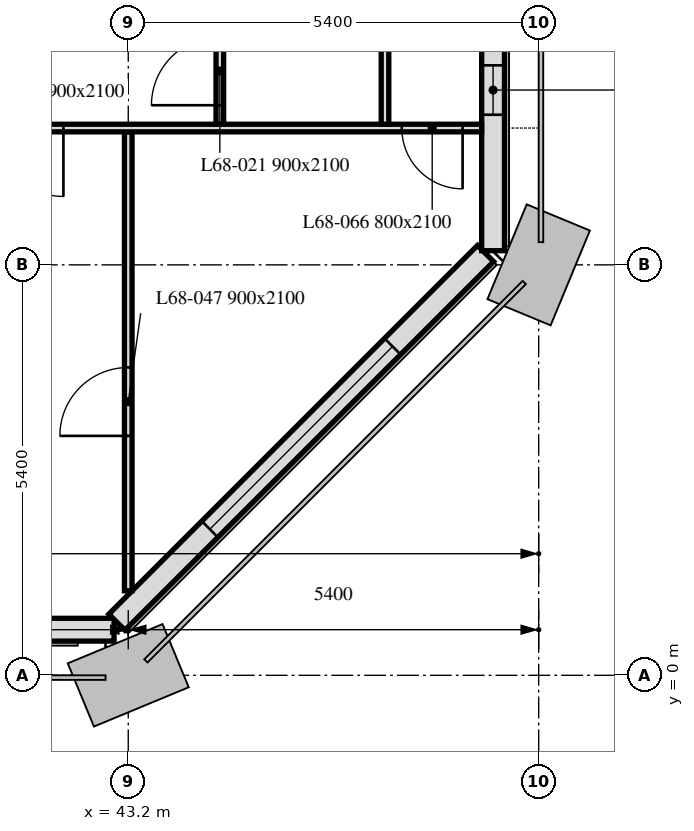
"""IFC4 building model, lengths in metres.
Left out: names, types, materials, properties, quantities, classifications, styles, units other than length and angle.
Written with IfcOpenShell. Run it as: python <this file> out.ifc"""

import sys

from ifc_helpers import new_model, si_unit, direction, frame, frame_2d, origin, place, context, subcontext, project, spatial, rectangle, extrude, element, fill, save


model = new_model("IFC4")
c1 = context("Model", 3, precision=1e-05, world=origin(), true_north=direction((0.0, 1.0)))
c2 = subcontext(c1, "Body", "Model", "MODEL_VIEW")
j1 = project(units=[si_unit("LENGTHUNIT", "METRE"), si_unit("PLANEANGLEUNIT", "RADIAN")], contexts=[c1])
p1 = place(None, origin())
s1 = spatial("IfcSite", under=j1, at=p1, CompositionType="ELEMENT")
p2 = place(p1, origin())
s2 = spatial("IfcBuilding", under=s1, at=p2, CompositionType="ELEMENT")
p3 = place(p2, frame((0.0, 0.0, 278.5)))
s3 = spatial("IfcBuildingStorey", under=s2, at=p3, CompositionType="ELEMENT", Elevation=278.5)
p4 = place(p3, frame((10.986, 0.6, 0.0), z_axis=(0.0, 0.0, 1.0), x_axis=(1.0, 0.0, 0.0)))
e1 = element("IfcWall", 1, at=p4, inside=s3, PredefinedType="SOLIDWALL", context=c2, shape_type="SweptSolid", body=[
    extrude(rectangle(XDim=32.027, YDim=0.3, at=frame_2d((16.014, 0.0))), origin(), (0.0, 0.0, 1.0), 3.0),
])
p5 = place(p4, frame((0.814, 0.0, 0.9)))
e2 = element("IfcOpeningElement", 2, at=p5, cuts=e1, PredefinedType="OPENING", context=c2, shape_type="SweptSolid", body=[
    extrude(rectangle(XDim=3.4, YDim=1.7, at=frame_2d((1.7, 0.85))), frame((0.0, 0.16, 0.0), z_axis=(0.0, -1.0, 0.0), x_axis=(1.0, 0.0, 0.0)), (0.0, 0.0, 1.0), 0.32),
])
p6 = place(p4, frame((6.564, 0.0, 0.9)))
e3 = element("IfcOpeningElement", 3, at=p6, cuts=e1, PredefinedType="OPENING", context=c2, shape_type="SweptSolid", body=[
    extrude(rectangle(XDim=1.1, YDim=1.7, at=frame_2d((0.55, 0.85))), frame((0.0, 0.16, 0.0), z_axis=(0.0, -1.0, 0.0), x_axis=(1.0, 0.0, 0.0)), (0.0, 0.0, 1.0), 0.32),
])
p7 = place(p4, frame((11.614, 0.0, 0.9)))
e4 = element("IfcOpeningElement", 4, at=p7, cuts=e1, PredefinedType="OPENING", context=c2, shape_type="SweptSolid", body=[
    extrude(rectangle(XDim=3.4, YDim=1.7, at=frame_2d((1.7, 0.85))), frame((0.0, 0.16, 0.0), z_axis=(0.0, -1.0, 0.0), x_axis=(1.0, 0.0, 0.0)), (0.0, 0.0, 1.0), 0.32),
])
p8 = place(p4, frame((17.364, 0.0, 0.9)))
e5 = element("IfcOpeningElement", 5, at=p8, cuts=e1, PredefinedType="OPENING", context=c2, shape_type="SweptSolid", body=[
    extrude(rectangle(XDim=1.1, YDim=1.7, at=frame_2d((0.55, 0.85))), frame((0.0, 0.16, 0.0), z_axis=(0.0, -1.0, 0.0), x_axis=(1.0, 0.0, 0.0)), (0.0, 0.0, 1.0), 0.32),
])
p9 = place(p4, frame((22.414, 0.0, 0.9)))
e6 = element("IfcOpeningElement", 6, at=p9, cuts=e1, PredefinedType="OPENING", context=c2, shape_type="SweptSolid", body=[
    extrude(rectangle(XDim=3.4, YDim=1.7, at=frame_2d((1.7, 0.85))), frame((0.0, 0.16, 0.0), z_axis=(0.0, -1.0, 0.0), x_axis=(1.0, 0.0, 0.0)), (0.0, 0.0, 1.0), 0.32),
])
p10 = place(p4, frame((28.164, 0.0, 0.9)))
e7 = element("IfcOpeningElement", 7, at=p10, cuts=e1, PredefinedType="OPENING", context=c2, shape_type="SweptSolid", body=[
    extrude(rectangle(XDim=1.1, YDim=1.7, at=frame_2d((0.55, 0.85))), frame((0.0, 0.16, 0.0), z_axis=(0.0, -1.0, 0.0), x_axis=(1.0, 0.0, 0.0)), (0.0, 0.0, 1.0), 0.32),
])
p11 = place(p3, frame((43.051, 0.699, 0.0), z_axis=(0.0, 0.0, 1.0), x_axis=(0.707106781187, 0.707106781187, 0.0)))
e8 = element("IfcWall", 8, at=p11, inside=s3, PredefinedType="SOLIDWALL", context=c2, shape_type="SweptSolid", body=[
    extrude(rectangle(XDim=6.86, YDim=0.3, at=frame_2d((3.43, 0.0))), origin(), (0.0, 0.0, 1.0), 3.0),
])
p12 = place(p11, frame((1.73, 0.0, 0.9)))
e9 = element("IfcOpeningElement", 9, at=p12, cuts=e8, PredefinedType="OPENING", context=c2, shape_type="SweptSolid", body=[
    extrude(rectangle(XDim=3.4, YDim=1.7, at=frame_2d((1.7, 0.85))), frame((0.0, 0.16, 0.0), z_axis=(0.0, -1.0, 0.0), x_axis=(1.0, 0.0, 0.0)), (0.0, 0.0, 1.0), 0.32),
])
p13 = place(p3, frame((48.0, 5.586, 0.0), z_axis=(0.0, 0.0, 1.0), x_axis=(0.0, 1.0, 0.0)))
e10 = element("IfcWall", 10, at=p13, inside=s3, PredefinedType="SOLIDWALL", context=c2, shape_type="SweptSolid", body=[
    extrude(rectangle(XDim=32.027, YDim=0.3, at=frame_2d((16.014, 0.0))), origin(), (0.0, 0.0, 1.0), 3.0),
])
p14 = place(p13, frame((1.789, 0.0, 0.9)))
e11 = element("IfcOpeningElement", 11, at=p14, cuts=e10, PredefinedType="OPENING", context=c2, shape_type="SweptSolid", body=[
    extrude(rectangle(XDim=0.65, YDim=1.7, at=frame_2d((0.325, 0.85))), frame((0.0, 0.16, 0.0), z_axis=(0.0, -1.0, 0.0), x_axis=(1.0, 0.0, 0.0)), (0.0, 0.0, 1.0), 0.32),
])
p15 = place(p13, frame((2.764, 0.0, 0.9)))
e12 = element("IfcOpeningElement", 12, at=p15, cuts=e10, PredefinedType="OPENING", context=c2, shape_type="SweptSolid", body=[
    extrude(rectangle(XDim=1.1, YDim=1.7, at=frame_2d((0.55, 0.85))), frame((0.0, 0.16, 0.0), z_axis=(0.0, -1.0, 0.0), x_axis=(1.0, 0.0, 0.0)), (0.0, 0.0, 1.0), 0.32),
])
p16 = place(p13, frame((6.564, 0.0, 0.9)))
e13 = element("IfcOpeningElement", 13, at=p16, cuts=e10, PredefinedType="OPENING", context=c2, shape_type="SweptSolid", body=[
    extrude(rectangle(XDim=1.1, YDim=1.7, at=frame_2d((0.55, 0.85))), frame((0.0, 0.16, 0.0), z_axis=(0.0, -1.0, 0.0), x_axis=(1.0, 0.0, 0.0)), (0.0, 0.0, 1.0), 0.32),
])
p17 = place(p13, frame((7.989, 0.0, 0.9)))
e14 = element("IfcOpeningElement", 14, at=p17, cuts=e10, PredefinedType="OPENING", context=c2, shape_type="SweptSolid", body=[
    extrude(rectangle(XDim=0.65, YDim=1.7, at=frame_2d((0.325, 0.85))), frame((0.0, 0.16, 0.0), z_axis=(0.0, -1.0, 0.0), x_axis=(1.0, 0.0, 0.0)), (0.0, 0.0, 1.0), 0.32),
])
p18 = place(p13, frame((11.614, 0.0, 0.9)))
e15 = element("IfcOpeningElement", 15, at=p18, cuts=e10, PredefinedType="OPENING", context=c2, shape_type="SweptSolid", body=[
    extrude(rectangle(XDim=3.4, YDim=1.7, at=frame_2d((1.7, 0.85))), frame((0.0, 0.16, 0.0), z_axis=(0.0, -1.0, 0.0), x_axis=(1.0, 0.0, 0.0)), (0.0, 0.0, 1.0), 0.32),
])
p19 = place(p13, frame((17.364, 0.0, 0.9)))
e16 = element("IfcOpeningElement", 16, at=p19, cuts=e10, PredefinedType="OPENING", context=c2, shape_type="SweptSolid", body=[
    extrude(rectangle(XDim=1.1, YDim=1.7, at=frame_2d((0.55, 0.85))), frame((0.0, 0.16, 0.0), z_axis=(0.0, -1.0, 0.0), x_axis=(1.0, 0.0, 0.0)), (0.0, 0.0, 1.0), 0.32),
])
p20 = place(p13, frame((18.964, 0.0, 0.9)))
e17 = element("IfcOpeningElement", 17, at=p20, cuts=e10, PredefinedType="OPENING", context=c2, shape_type="SweptSolid", body=[
    extrude(rectangle(XDim=1.1, YDim=1.7, at=frame_2d((0.55, 0.85))), frame((0.0, 0.16, 0.0), z_axis=(0.0, -1.0, 0.0), x_axis=(1.0, 0.0, 0.0)), (0.0, 0.0, 1.0), 0.32),
])
p21 = place(p13, frame((22.414, 0.0, 0.9)))
e18 = element("IfcOpeningElement", 18, at=p21, cuts=e10, PredefinedType="OPENING", context=c2, shape_type="SweptSolid", body=[
    extrude(rectangle(XDim=3.4, YDim=1.7, at=frame_2d((1.7, 0.85))), frame((0.0, 0.16, 0.0), z_axis=(0.0, -1.0, 0.0), x_axis=(1.0, 0.0, 0.0)), (0.0, 0.0, 1.0), 0.32),
])
p22 = place(p13, frame((28.789, 0.0, 0.9)))
e19 = element("IfcOpeningElement", 19, at=p22, cuts=e10, PredefinedType="OPENING", context=c2, shape_type="SweptSolid", body=[
    extrude(rectangle(XDim=0.65, YDim=1.7, at=frame_2d((0.325, 0.85))), frame((0.0, 0.16, 0.0), z_axis=(0.0, -1.0, 0.0), x_axis=(1.0, 0.0, 0.0)), (0.0, 0.0, 1.0), 0.32),
])
p23 = place(p13, frame((29.764, 0.0, 0.9)))
e20 = element("IfcOpeningElement", 20, at=p23, cuts=e10, PredefinedType="OPENING", context=c2, shape_type="SweptSolid", body=[
    extrude(rectangle(XDim=1.1, YDim=1.7, at=frame_2d((0.55, 0.85))), frame((0.0, 0.16, 0.0), z_axis=(0.0, -1.0, 0.0), x_axis=(1.0, 0.0, 0.0)), (0.0, 0.0, 1.0), 0.32),
])
p24 = place(p3, frame((43.2, 1.112, 0.0), z_axis=(0.0, 0.0, 1.0), x_axis=(0.0, 1.0, 0.0)))
e21 = element("IfcWall", 21, at=p24, inside=s3, PredefinedType="PARTITIONING", context=c2, shape_type="SweptSolid", body=[
    extrude(rectangle(XDim=6.038, YDim=0.1, at=frame_2d((3.019, 0.0))), origin(), (0.0, 0.0, 1.0), 3.0),
])
p25 = place(p24, frame((2.038, 0.0, 0.0)))
e22 = element("IfcOpeningElement", 22, at=p25, cuts=e21, PredefinedType="OPENING", context=c2, shape_type="SweptSolid", body=[
    extrude(rectangle(XDim=0.9, YDim=2.1, at=frame_2d((0.45, 1.05))), frame((0.0, 0.05, 0.0), z_axis=(0.0, -1.0, 0.0), x_axis=(1.0, 0.0, 0.0)), (0.0, 0.0, 1.0), 0.1),
])
p26 = place(p3, frame((47.849, 7.2, 0.0), z_axis=(0.0, 0.0, 1.0), x_axis=(-1.0, 0.0, 0.0)))
e23 = element("IfcWall", 23, at=p26, inside=s3, PredefinedType="PARTITIONING", context=c2, shape_type="SweptSolid", body=[
    extrude(rectangle(XDim=9.974, YDim=0.1, at=frame_2d((4.987, 0.0))), origin(), (0.0, 0.0, 1.0), 3.0),
])
p27 = place(p26, frame((7.555, 0.0, 0.0)))
e24 = element("IfcOpeningElement", 24, at=p27, cuts=e23, PredefinedType="OPENING", context=c2, shape_type="SweptSolid", body=[
    extrude(rectangle(XDim=0.9, YDim=2.1, at=frame_2d((0.45, 1.05))), frame((0.0, 0.05, 0.0), z_axis=(0.0, -1.0, 0.0), x_axis=(1.0, 0.0, 0.0)), (0.0, 0.0, 1.0), 0.1),
])
p28 = place(p26, frame((5.502, 0.0, 0.0)))
e25 = element("IfcOpeningElement", 25, at=p28, cuts=e23, PredefinedType="OPENING", context=c2, shape_type="SweptSolid", body=[
    extrude(rectangle(XDim=0.9, YDim=2.1, at=frame_2d((0.45, 1.05))), frame((0.0, 0.05, 0.0), z_axis=(0.0, -1.0, 0.0), x_axis=(1.0, 0.0, 0.0)), (0.0, 0.0, 1.0), 0.1),
])
p29 = place(p26, frame((0.25, 0.0, 0.0)))
e26 = element("IfcOpeningElement", 26, at=p29, cuts=e23, PredefinedType="OPENING", context=c2, shape_type="SweptSolid", body=[
    extrude(rectangle(XDim=0.8, YDim=2.1, at=frame_2d((0.4, 1.05))), frame((0.0, 0.05, 0.0), z_axis=(0.0, -1.0, 0.0), x_axis=(1.0, 0.0, 0.0)), (0.0, 0.0, 1.0), 0.1),
])
p30 = place(p3, frame((44.405, 7.25, 0.0), z_axis=(0.0, 0.0, 1.0), x_axis=(0.0, 1.0, 0.0)))
e27 = element("IfcWall", 27, at=p30, inside=s3, PredefinedType="PARTITIONING", context=c2, shape_type="SweptSolid", body=[
    extrude(rectangle(XDim=7.075, YDim=0.1, at=frame_2d((3.538, 0.0))), origin(), (0.0, 0.0, 1.0), 2.4),
])
p31 = place(p30, frame((0.25, 0.0, 0.0)))
e28 = element("IfcOpeningElement", 28, at=p31, cuts=e27, PredefinedType="OPENING", context=c2, shape_type="SweptSolid", body=[
    extrude(rectangle(XDim=0.9, YDim=2.1, at=frame_2d((0.45, 1.05))), frame((0.0, 0.05, 0.0), z_axis=(0.0, -1.0, 0.0), x_axis=(1.0, 0.0, 0.0)), (0.0, 0.0, 1.0), 0.1),
])
p32 = place(p30, frame((5.925, 0.0, 0.0)))
e29 = element("IfcOpeningElement", 29, at=p32, cuts=e27, PredefinedType="OPENING", context=c2, shape_type="SweptSolid", body=[
    extrude(rectangle(XDim=0.9, YDim=2.1, at=frame_2d((0.45, 1.05))), frame((0.0, 0.05, 0.0), z_axis=(0.0, -1.0, 0.0), x_axis=(1.0, 0.0, 0.0)), (0.0, 0.0, 1.0), 0.1),
])
p33 = place(p3, frame((46.578, 7.25, 0.0), z_axis=(0.0, 0.0, 1.0), x_axis=(0.0, 1.0, 0.0)))
e30 = element("IfcWall", 30, at=p33, inside=s3, PredefinedType="PARTITIONING", context=c2, shape_type="SweptSolid", body=[
    extrude(rectangle(XDim=7.075, YDim=0.1, at=frame_2d((3.538, 0.0))), origin(), (0.0, 0.0, 1.0), 2.4),
])
p34 = place(p33, frame((5.2, 0.0, 0.0)))
e31 = element("IfcOpeningElement", 31, at=p34, cuts=e30, PredefinedType="OPENING", context=c2, shape_type="SweptSolid", body=[
    extrude(rectangle(XDim=0.9, YDim=2.1, at=frame_2d((0.45, 1.05))), frame((0.0, 0.05, 0.0), z_axis=(0.0, -1.0, 0.0), x_axis=(1.0, 0.0, 0.0)), (0.0, 0.0, 1.0), 0.1),
])
p35 = place(p12, origin())
e32 = element("IfcWindow", 32, at=p35, inside=s3, PartitioningType="SINGLE_PANEL", PredefinedType="WINDOW", context=c2, shape_type="SweptSolid", body=[
    extrude(rectangle(XDim=3.4, YDim=1.7, at=frame_2d((1.7, 0.85))), frame((0.0, 0.03, 0.0), z_axis=(0.0, -1.0, 0.0), x_axis=(1.0, 0.0, 0.0)), (0.0, 0.0, 1.0), 0.06),
])
fill(e9, e32)
p36 = place(p14, origin())
e33 = element("IfcWindow", 33, at=p36, inside=s3, PartitioningType="SINGLE_PANEL", PredefinedType="WINDOW", context=c2, shape_type="SweptSolid", body=[
    extrude(rectangle(XDim=0.65, YDim=1.7, at=frame_2d((0.325, 0.85))), frame((0.0, 0.03, 0.0), z_axis=(0.0, -1.0, 0.0), x_axis=(1.0, 0.0, 0.0)), (0.0, 0.0, 1.0), 0.06),
])
fill(e11, e33)
p37 = place(p31, origin())
e34 = element("IfcDoor", 34, at=p37, inside=s3, OperationType="SINGLE_SWING_RIGHT", PredefinedType="DOOR", context=c2, shape_type="SweptSolid", body=[
    extrude(rectangle(XDim=0.9, YDim=2.1, at=frame_2d((0.45, 1.05))), frame((0.0, 0.025, 0.0), z_axis=(0.0, -1.0, 0.0), x_axis=(1.0, 0.0, 0.0)), (0.0, 0.0, 1.0), 0.05),
])
fill(e28, e34)
p38 = place(p25, origin())
e35 = element("IfcDoor", 35, at=p38, inside=s3, OperationType="SINGLE_SWING_LEFT", PredefinedType="DOOR", context=c2, shape_type="SweptSolid", body=[
    extrude(rectangle(XDim=0.9, YDim=2.1, at=frame_2d((0.45, 1.05))), frame((0.0, 0.025, 0.0), z_axis=(0.0, -1.0, 0.0), x_axis=(1.0, 0.0, 0.0)), (0.0, 0.0, 1.0), 0.05),
])
fill(e22, e35)
p39 = place(p28, origin())
e36 = element("IfcDoor", 36, at=p39, inside=s3, OperationType="SINGLE_SWING_RIGHT", PredefinedType="DOOR", context=c2, shape_type="SweptSolid", body=[
    extrude(rectangle(XDim=0.9, YDim=2.1, at=frame_2d((0.45, 1.05))), frame((0.0, 0.025, 0.0), z_axis=(0.0, -1.0, 0.0), x_axis=(1.0, 0.0, 0.0)), (0.0, 0.0, 1.0), 0.05),
])
fill(e25, e36)
p40 = place(p29, origin())
e37 = element("IfcDoor", 37, at=p40, inside=s3, OperationType="SINGLE_SWING_RIGHT", PredefinedType="DOOR", context=c2, shape_type="SweptSolid", body=[
    extrude(rectangle(XDim=0.8, YDim=2.1, at=frame_2d((0.4, 1.05))), frame((0.0, 0.025, 0.0), z_axis=(0.0, -1.0, 0.0), x_axis=(1.0, 0.0, 0.0)), (0.0, 0.0, 1.0), 0.05),
])
fill(e26, e37)
save(model, sys.argv[1])
